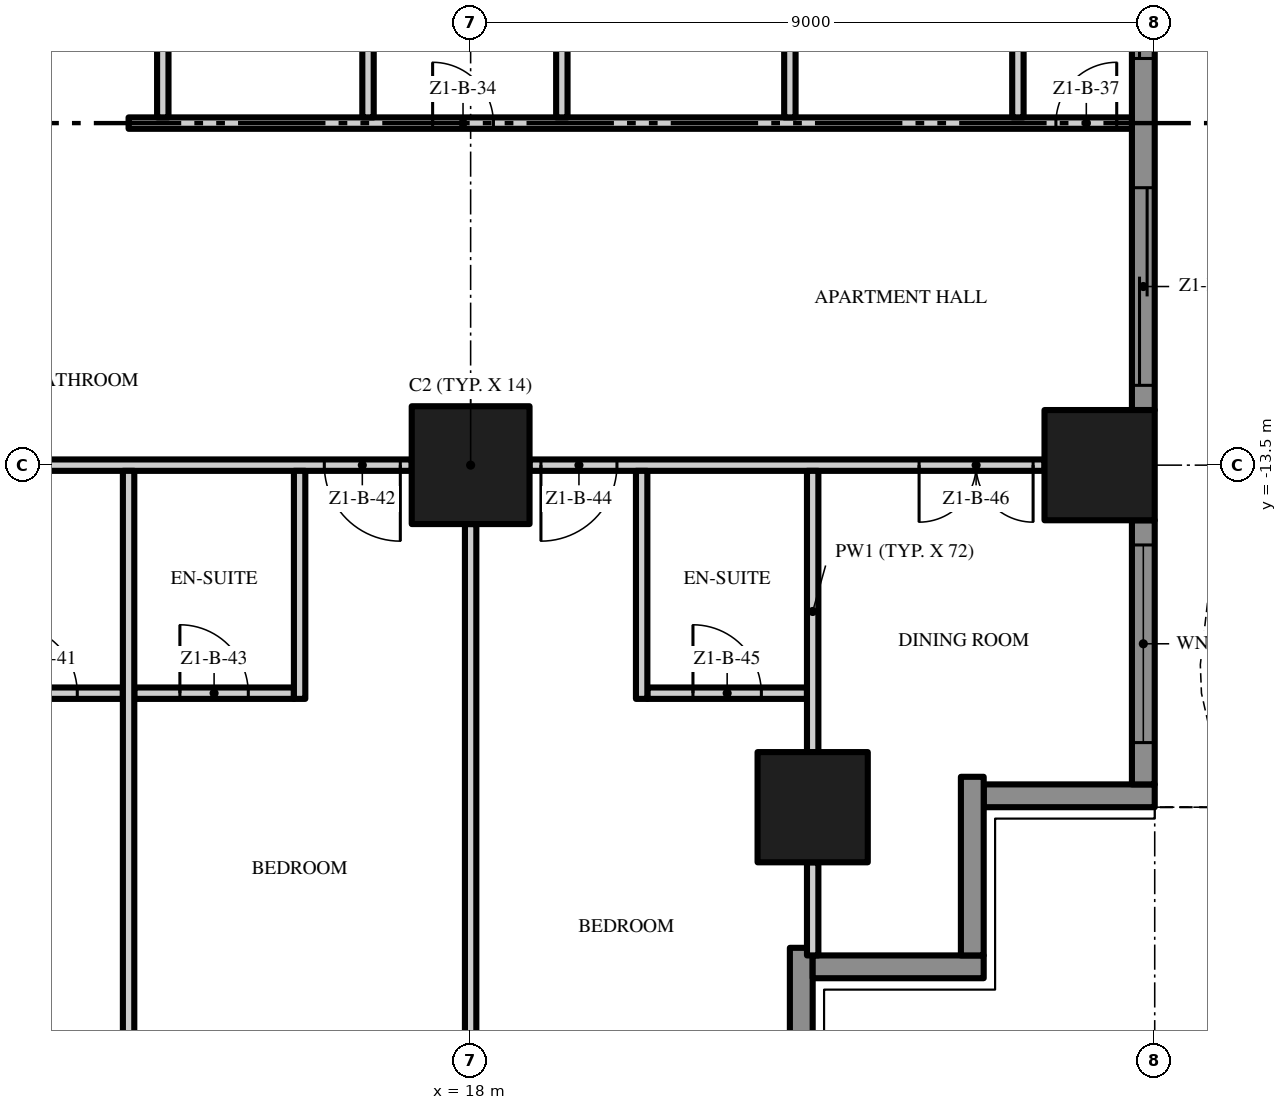
"""IFC4 building model, lengths in metres.
Left out: names, types, materials, properties, quantities, classifications, styles, units other than length and angle.
Written with IfcOpenShell. Run it as: python <this file> out.ifc"""

import sys

from ifc_helpers import new_model, si_unit, direction, frame, frame_2d, origin, origin_2d, place, context, subcontext, project, spatial, polyline, rectangle, outline, extrude, element, fill, save


model = new_model("IFC4")
c1 = context("Model", 3, precision=1e-05, world=origin(), true_north=direction((0.0, 1.0)))
c2 = subcontext(c1, "Body", "Model", "MODEL_VIEW")
j1 = project(units=[si_unit("LENGTHUNIT", "METRE"), si_unit("PLANEANGLEUNIT", "RADIAN")], contexts=[c1])
p1 = place(None, origin())
s1 = spatial("IfcSite", under=j1, at=p1, CompositionType="ELEMENT")
p2 = place(p1, origin())
s2 = spatial("IfcBuilding", under=s1, at=p2, CompositionType="ELEMENT")
p3 = place(p2, frame((0.0, 0.0, 34.0)))
s3 = spatial("IfcBuildingStorey", under=s2, at=p3, CompositionType="ELEMENT", Elevation=34.0)
p4 = place(p3, frame((18.0, -13.5, 0.0), z_axis=(0.0, 0.0, 1.0), x_axis=(1.0, 0.0, 0.0)))
e1 = element("IfcColumn", 1, at=p4, inside=s3, PredefinedType="COLUMN", context=c2, shape_type="SweptSolid", body=[
    extrude(rectangle(XDim=1.55, YDim=1.55, at=origin_2d()), origin(), (0.0, 0.0, 1.0), 3.5),
])
for number, where, z_axis, x_axis in (
    (2, (26.275, -13.5, 0.0), (0.0, 0.0, 1.0), (1.0, 0.0, 0.0)),
    (3, (22.5, -18.0, 0.0), (0.0, 0.0, 1.0), (1.0, 0.0, 0.0)),
):
    element("IfcColumn", number, at=place(p3, frame(where, z_axis=z_axis, x_axis=x_axis)), inside=s3, PredefinedType="COLUMN", context=c2, shape_type="SweptSolid", body=[
        extrude(rectangle(XDim=1.45, YDim=1.45, at=origin_2d()), origin(), (0.0, 0.0, 1.0), 3.5),
    ])
p5 = place(p3, frame((22.35, -19.85, 0.0), z_axis=(0.0, 0.0, 1.0), x_axis=(0.0, -1.0, 0.0)))
e4 = element("IfcWall", 4, at=p5, inside=s3, PredefinedType="SOLIDWALL", context=c2, shape_type="SweptSolid", body=[
    extrude(rectangle(XDim=2.35, YDim=0.3, at=frame_2d((1.175, 0.0))), origin(), (0.0, 0.0, 1.0), 3.5),
])
p6 = place(p3, frame((24.75, -20.1, 0.0), z_axis=(0.0, 0.0, 1.0), x_axis=(-1.0, 0.0, 0.0)))
e5 = element("IfcWall", 5, at=p6, inside=s3, PredefinedType="SOLIDWALL", context=c2, shape_type="SweptSolid", body=[
    extrude(rectangle(XDim=2.25, YDim=0.3, at=frame_2d((1.125, 0.0))), origin(), (0.0, 0.0, 1.0), 3.5),
])
p7 = place(p3, frame((24.6, -17.6, 0.0), z_axis=(0.0, 0.0, 1.0), x_axis=(0.0, -1.0, 0.0)))
e6 = element("IfcWall", 6, at=p7, inside=s3, PredefinedType="SOLIDWALL", context=c2, shape_type="SweptSolid", body=[
    extrude(rectangle(XDim=2.35, YDim=0.3, at=frame_2d((1.175, 0.0))), origin(), (0.0, 0.0, 1.0), 3.5),
])
p8 = place(p3, frame((27.0, -17.85, 0.0), z_axis=(0.0, 0.0, 1.0), x_axis=(-1.0, 0.0, 0.0)))
e7 = element("IfcWall", 7, at=p8, inside=s3, PredefinedType="SOLIDWALL", context=c2, shape_type="SweptSolid", body=[
    extrude(rectangle(XDim=2.25, YDim=0.3, at=frame_2d((1.125, 0.0))), origin(), (0.0, 0.0, 1.0), 3.5),
])
p9 = place(p3, frame((26.85, -14.225, 0.0), z_axis=(0.0, 0.0, 1.0), x_axis=(0.0, -1.0, 0.0)))
e8 = element("IfcWall", 8, at=p9, inside=s3, PredefinedType="SOLIDWALL", context=c2, shape_type="SweptSolid", body=[
    extrude(rectangle(XDim=3.475, YDim=0.3, at=frame_2d((1.738, 0.0))), origin(), (0.0, 0.0, 1.0), 3.5),
])
p10 = place(p9, frame((0.325, 0.0, 0.45)))
e9 = element("IfcOpeningElement", 9, at=p10, cuts=e8, PredefinedType="OPENING", context=c2, shape_type="SweptSolid", body=[
    extrude(rectangle(XDim=2.6, YDim=2.65, at=frame_2d((1.3, 1.325))), frame((0.0, 0.16, 0.0), z_axis=(0.0, -1.0, 0.0), x_axis=(1.0, 0.0, 0.0)), (0.0, 0.0, 1.0), 0.32),
])
p11 = place(p3, frame((26.85, -5.225, 0.0), z_axis=(0.0, 0.0, 1.0), x_axis=(0.0, -1.0, 0.0)))
e10 = element("IfcWall", 10, at=p11, inside=s3, PredefinedType="SOLIDWALL", context=c2, shape_type="SweptSolid", body=[
    extrude(rectangle(XDim=7.55, YDim=0.3, at=frame_2d((3.775, 0.0))), origin(), (0.0, 0.0, 1.0), 3.5),
])
p12 = place(p11, frame((4.625, 0.0, 0.0)))
e11 = element("IfcOpeningElement", 11, at=p12, cuts=e10, PredefinedType="OPENING", context=c2, shape_type="SweptSolid", body=[
    extrude(rectangle(XDim=2.6, YDim=2.4, at=frame_2d((1.3, 1.2))), frame((0.0, 0.16, 0.0), z_axis=(0.0, -1.0, 0.0), x_axis=(1.0, 0.0, 0.0)), (0.0, 0.0, 1.0), 0.32),
])
p13 = place(p11, frame((0.325, 0.0, 0.0)))
e12 = element("IfcOpeningElement", 12, at=p13, cuts=e10, PredefinedType="OPENING", context=c2, shape_type="SweptSolid", body=[
    extrude(rectangle(XDim=2.6, YDim=2.4, at=frame_2d((1.3, 1.2))), frame((0.0, 0.16, 0.0), z_axis=(0.0, -1.0, 0.0), x_axis=(1.0, 0.0, 0.0)), (0.0, 0.0, 1.0), 0.32),
])
p14 = place(p3, origin())
e13 = element("IfcWall", 13, at=p14, inside=s3, PredefinedType="USERDEFINED", context=c2, shape_type="SweptSolid", body=[
    extrude(outline(polyline([(27.951, -18.0), (27.615, -16.5), (27.6, -16.125), (27.731, -15.0), (28.255, -13.5), (28.988, -12.0), (29.649, -10.5), (29.985, -9.0), (30.0, -8.625), (29.869, -7.5), (29.345, -6.0), (28.612, -4.5), (27.951, -3.0), (27.615, -1.5), (27.6, -1.125), (27.731, 0.0), (28.255, 1.5), (28.988, 3.0), (29.649, 4.5), (29.985, 6.0), (30.0, 6.375), (29.869, 7.5), (29.345, 9.0), (28.612, 10.5), (27.951, 12.0), (27.615, 13.5), (27.6, 13.875), (27.731, 15.0), (28.255, 16.5), (28.988, 18.0), (28.763, 18.11), (28.024, 16.596), (27.486, 15.056), (27.349, 13.885), (27.366, 13.467), (27.713, 11.921), (28.385, 10.395), (29.114, 8.904), (29.624, 7.444), (29.749, 6.365), (29.736, 6.033), (29.41, 4.579), (28.761, 3.105), (28.024, 1.596), (27.486, 0.056), (27.349, -1.115), (27.366, -1.533), (27.713, -3.079), (28.385, -4.605), (29.114, -6.096), (29.624, -7.556), (29.749, -8.635), (29.736, -8.967), (29.41, -10.421), (28.761, -11.895), (28.024, -13.404), (27.486, -14.944), (27.349, -16.115), (27.366, -16.533), (27.708, -18.055), (27.951, -18.0)])), origin(), (0.0, 0.0, 1.0), 0.9),
])
p15 = place(p3, frame((11.325, -16.5, 0.0), z_axis=(0.0, 0.0, 1.0), x_axis=(1.0, 0.0, 0.0)))
e14 = element("IfcWall", 14, at=p15, inside=s3, PredefinedType="PARTITIONING", context=c2, shape_type="SweptSolid", body=[
    extrude(rectangle(XDim=2.1, YDim=0.15, at=frame_2d((1.05, 0.0))), origin(), (0.0, 0.0, 1.0), 3.5),
])
p16 = place(p15, frame((0.6, 0.0, 0.0)))
e15 = element("IfcOpeningElement", 15, at=p16, cuts=e14, PredefinedType="OPENING", context=c2, shape_type="SweptSolid", body=[
    extrude(rectangle(XDim=0.9, YDim=2.1, at=frame_2d((0.45, 1.05))), frame((0.0, 0.085, 0.0), z_axis=(0.0, -1.0, 0.0), x_axis=(1.0, 0.0, 0.0)), (0.0, 0.0, 1.0), 0.17),
])
p17 = place(p3, frame((13.575, -16.5, 0.0), z_axis=(0.0, 0.0, 1.0), x_axis=(1.0, 0.0, 0.0)))
e16 = element("IfcWall", 16, at=p17, inside=s3, PredefinedType="PARTITIONING", context=c2, shape_type="SweptSolid", body=[
    extrude(rectangle(XDim=2.1, YDim=0.15, at=frame_2d((1.05, 0.0))), origin(), (0.0, 0.0, 1.0), 3.5),
])
p18 = place(p17, frame((0.6, 0.0, 0.0)))
e17 = element("IfcOpeningElement", 17, at=p18, cuts=e16, PredefinedType="OPENING", context=c2, shape_type="SweptSolid", body=[
    extrude(rectangle(XDim=0.9, YDim=2.1, at=frame_2d((0.45, 1.05))), frame((0.0, 0.085, 0.0), z_axis=(0.0, -1.0, 0.0), x_axis=(1.0, 0.0, 0.0)), (0.0, 0.0, 1.0), 0.17),
])
p19 = place(p3, frame((20.325, -16.5, 0.0), z_axis=(0.0, 0.0, 1.0), x_axis=(1.0, 0.0, 0.0)))
e18 = element("IfcWall", 18, at=p19, inside=s3, PredefinedType="PARTITIONING", context=c2, shape_type="SweptSolid", body=[
    extrude(rectangle(XDim=2.1, YDim=0.15, at=frame_2d((1.05, 0.0))), origin(), (0.0, 0.0, 1.0), 3.5),
])
p20 = place(p19, frame((0.6, 0.0, 0.0)))
e19 = element("IfcOpeningElement", 19, at=p20, cuts=e18, PredefinedType="OPENING", context=c2, shape_type="SweptSolid", body=[
    extrude(rectangle(XDim=0.9, YDim=2.1, at=frame_2d((0.45, 1.05))), frame((0.0, 0.085, 0.0), z_axis=(0.0, -1.0, 0.0), x_axis=(1.0, 0.0, 0.0)), (0.0, 0.0, 1.0), 0.17),
])
p21 = place(p3, frame((17.225, -13.5, 0.0), z_axis=(0.0, 0.0, 1.0), x_axis=(-1.0, 0.0, 0.0)))
e20 = element("IfcWall", 20, at=p21, inside=s3, PredefinedType="PARTITIONING", context=c2, shape_type="SweptSolid", body=[
    extrude(rectangle(XDim=7.45, YDim=0.15, at=frame_2d((3.725, 0.0))), origin(), (0.0, 0.0, 1.0), 3.5),
])
p22 = place(p21, frame((6.3, 0.0, 0.0)))
e21 = element("IfcOpeningElement", 21, at=p22, cuts=e20, PredefinedType="OPENING", context=c2, shape_type="SweptSolid", body=[
    extrude(rectangle(XDim=1.0, YDim=2.4, at=frame_2d((0.5, 1.2))), frame((0.0, 0.085, 0.0), z_axis=(0.0, -1.0, 0.0), x_axis=(1.0, 0.0, 0.0)), (0.0, 0.0, 1.0), 0.17),
])
p23 = place(p21, frame((0.15, 0.0, 0.0)))
e22 = element("IfcOpeningElement", 22, at=p23, cuts=e20, PredefinedType="OPENING", context=c2, shape_type="SweptSolid", body=[
    extrude(rectangle(XDim=1.0, YDim=2.4, at=frame_2d((0.5, 1.2))), frame((0.0, 0.085, 0.0), z_axis=(0.0, -1.0, 0.0), x_axis=(1.0, 0.0, 0.0)), (0.0, 0.0, 1.0), 0.17),
])
p24 = place(p3, frame((25.55, -13.5, 0.0), z_axis=(0.0, 0.0, 1.0), x_axis=(-1.0, 0.0, 0.0)))
e23 = element("IfcWall", 23, at=p24, inside=s3, PredefinedType="PARTITIONING", context=c2, shape_type="SweptSolid", body=[
    extrude(rectangle(XDim=6.775, YDim=0.15, at=frame_2d((3.388, 0.0))), origin(), (0.0, 0.0, 1.0), 3.5),
])
p25 = place(p24, frame((5.625, 0.0, 0.0)))
e24 = element("IfcOpeningElement", 24, at=p25, cuts=e23, PredefinedType="OPENING", context=c2, shape_type="SweptSolid", body=[
    extrude(rectangle(XDim=1.0, YDim=2.4, at=frame_2d((0.5, 1.2))), frame((0.0, 0.085, 0.0), z_axis=(0.0, -1.0, 0.0), x_axis=(1.0, 0.0, 0.0)), (0.0, 0.0, 1.0), 0.17),
])
p26 = place(p24, frame((0.15, 0.0, 0.0)))
e25 = element("IfcOpeningElement", 25, at=p26, cuts=e23, PredefinedType="OPENING", context=c2, shape_type="SweptSolid", body=[
    extrude(rectangle(XDim=1.5, YDim=2.4, at=frame_2d((0.75, 1.2))), frame((0.0, 0.085, 0.0), z_axis=(0.0, -1.0, 0.0), x_axis=(1.0, 0.0, 0.0)), (0.0, 0.0, 1.0), 0.17),
])
p27 = place(p3, frame((13.5, -9.0, 0.0), z_axis=(0.0, 0.0, 1.0), x_axis=(1.0, 0.0, 0.0)))
e26 = element("IfcWall", 26, at=p27, inside=s3, PredefinedType="PARTITIONING", context=c2, shape_type="SweptSolid", body=[
    extrude(rectangle(XDim=13.2, YDim=0.15, at=frame_2d((6.6, 0.0))), origin(), (0.0, 0.0, 1.0), 3.5),
])
p28 = place(p27, frame((4.0, 0.0, 0.0)))
e27 = element("IfcOpeningElement", 27, at=p28, cuts=e26, PredefinedType="OPENING", context=c2, shape_type="SweptSolid", body=[
    extrude(rectangle(XDim=0.8, YDim=2.0, at=frame_2d((0.4, 1.0))), frame((0.0, 0.085, 0.0), z_axis=(0.0, -1.0, 0.0), x_axis=(1.0, 0.0, 0.0)), (0.0, 0.0, 1.0), 0.17),
])
p29 = place(p27, frame((12.2, 0.0, 0.0)))
e28 = element("IfcOpeningElement", 28, at=p29, cuts=e26, PredefinedType="OPENING", context=c2, shape_type="SweptSolid", body=[
    extrude(rectangle(XDim=0.8, YDim=2.0, at=frame_2d((0.4, 1.0))), frame((0.0, 0.085, 0.0), z_axis=(0.0, -1.0, 0.0), x_axis=(1.0, 0.0, 0.0)), (0.0, 0.0, 1.0), 0.17),
])
p30 = place(p3, frame((13.5, -22.2, 0.0), z_axis=(0.0, 0.0, 1.0), x_axis=(0.0, 1.0, 0.0)))
e29 = element("IfcWall", 29, at=p30, inside=s3, PredefinedType="PARTITIONING", context=c2, shape_type="SweptSolid", body=[
    extrude(rectangle(XDim=8.625, YDim=0.15, at=frame_2d((4.312, 0.0))), origin(), (0.0, 0.0, 1.0), 3.5),
])
p31 = place(p3, frame((13.95, -8.925, 0.0), z_axis=(0.0, 0.0, 1.0), x_axis=(0.0, 1.0, 0.0)))
e30 = element("IfcWall", 30, at=p31, inside=s3, PredefinedType="PARTITIONING", context=c2, shape_type="SweptSolid", body=[
    extrude(rectangle(XDim=4.5, YDim=0.15, at=frame_2d((2.25, 0.0))), origin(), (0.0, 0.0, 1.0), 3.5),
])
p32 = place(p3, frame((15.75, -16.575, 0.0), z_axis=(0.0, 0.0, 1.0), x_axis=(0.0, 1.0, 0.0)))
e31 = element("IfcWall", 31, at=p32, inside=s3, PredefinedType="PARTITIONING", context=c2, shape_type="SweptSolid", body=[
    extrude(rectangle(XDim=3.0, YDim=0.15, at=frame_2d((1.5, 0.0))), origin(), (0.0, 0.0, 1.0), 3.5),
])
p33 = place(p3, frame((16.65, -8.925, 0.0), z_axis=(0.0, 0.0, 1.0), x_axis=(0.0, 1.0, 0.0)))
e32 = element("IfcWall", 32, at=p33, inside=s3, PredefinedType="PARTITIONING", context=c2, shape_type="SweptSolid", body=[
    extrude(rectangle(XDim=4.35, YDim=0.15, at=frame_2d((2.175, 0.0))), origin(), (0.0, 0.0, 1.0), 3.5),
])
p34 = place(p3, frame((18.0, -21.05, 0.0), z_axis=(0.0, 0.0, 1.0), x_axis=(0.0, 1.0, 0.0)))
e33 = element("IfcWall", 33, at=p34, inside=s3, PredefinedType="PARTITIONING", context=c2, shape_type="SweptSolid", body=[
    extrude(rectangle(XDim=6.775, YDim=0.15, at=frame_2d((3.388, 0.0))), origin(), (0.0, 0.0, 1.0), 3.5),
])
p35 = place(p3, frame((19.2, -8.925, 0.0), z_axis=(0.0, 0.0, 1.0), x_axis=(0.0, 1.0, 0.0)))
e34 = element("IfcWall", 34, at=p35, inside=s3, PredefinedType="PARTITIONING", context=c2, shape_type="SweptSolid", body=[
    extrude(rectangle(XDim=4.35, YDim=0.15, at=frame_2d((2.175, 0.0))), origin(), (0.0, 0.0, 1.0), 3.5),
])
p36 = place(p3, frame((20.25, -16.575, 0.0), z_axis=(0.0, 0.0, 1.0), x_axis=(0.0, 1.0, 0.0)))
e35 = element("IfcWall", 35, at=p36, inside=s3, PredefinedType="PARTITIONING", context=c2, shape_type="SweptSolid", body=[
    extrude(rectangle(XDim=3.0, YDim=0.15, at=frame_2d((1.5, 0.0))), origin(), (0.0, 0.0, 1.0), 3.5),
])
p37 = place(p3, frame((22.2, -8.925, 0.0), z_axis=(0.0, 0.0, 1.0), x_axis=(0.0, 1.0, 0.0)))
e36 = element("IfcWall", 36, at=p37, inside=s3, PredefinedType="PARTITIONING", context=c2, shape_type="SweptSolid", body=[
    extrude(rectangle(XDim=4.35, YDim=0.15, at=frame_2d((2.175, 0.0))), origin(), (0.0, 0.0, 1.0), 3.5),
])
p38 = place(p3, frame((22.5, -19.95, 0.0), z_axis=(0.0, 0.0, 1.0), x_axis=(0.0, 1.0, 0.0)))
e37 = element("IfcWall", 37, at=p38, inside=s3, PredefinedType="PARTITIONING", context=c2, shape_type="SweptSolid", body=[
    extrude(rectangle(XDim=1.225, YDim=0.15, at=frame_2d((0.613, 0.0))), origin(), (0.0, 0.0, 1.0), 3.5),
])
p39 = place(p3, frame((22.5, -17.275, 0.0), z_axis=(0.0, 0.0, 1.0), x_axis=(0.0, 1.0, 0.0)))
e38 = element("IfcWall", 38, at=p39, inside=s3, PredefinedType="PARTITIONING", context=c2, shape_type="SweptSolid", body=[
    extrude(rectangle(XDim=3.7, YDim=0.15, at=frame_2d((1.85, 0.0))), origin(), (0.0, 0.0, 1.0), 3.5),
])
p40 = place(p3, frame((25.2, -8.925, 0.0), z_axis=(0.0, 0.0, 1.0), x_axis=(0.0, 1.0, 0.0)))
e39 = element("IfcWall", 39, at=p40, inside=s3, PredefinedType="PARTITIONING", context=c2, shape_type="SweptSolid", body=[
    extrude(rectangle(XDim=4.35, YDim=0.15, at=frame_2d((2.175, 0.0))), origin(), (0.0, 0.0, 1.0), 3.5),
])
p41 = place(p10, origin())
e40 = element("IfcWindow", 40, at=p41, inside=s3, PartitioningType="SINGLE_PANEL", PredefinedType="WINDOW", context=c2, shape_type="SweptSolid", body=[
    extrude(rectangle(XDim=2.6, YDim=2.65, at=frame_2d((1.3, 1.325))), frame((0.0, 0.03, 0.0), z_axis=(0.0, -1.0, 0.0), x_axis=(1.0, 0.0, 0.0)), (0.0, 0.0, 1.0), 0.06),
])
fill(e9, e40)
p42 = place(p12, origin())
e41 = element("IfcDoor", 41, at=p42, inside=s3, OperationType="SINGLE_SWING_LEFT", PredefinedType="DOOR", context=c2, shape_type="SweptSolid", body=[
    extrude(rectangle(XDim=2.6, YDim=2.4, at=frame_2d((1.3, 1.2))), frame((0.0, 0.025, 0.0), z_axis=(0.0, -1.0, 0.0), x_axis=(1.0, 0.0, 0.0)), (0.0, 0.0, 1.0), 0.05),
])
fill(e11, e41)
p43 = place(p13, origin())
e42 = element("IfcDoor", 42, at=p43, inside=s3, OperationType="SINGLE_SWING_LEFT", PredefinedType="DOOR", context=c2, shape_type="SweptSolid", body=[
    extrude(rectangle(XDim=2.6, YDim=2.4, at=frame_2d((1.3, 1.2))), frame((0.0, 0.025, 0.0), z_axis=(0.0, -1.0, 0.0), x_axis=(1.0, 0.0, 0.0)), (0.0, 0.0, 1.0), 0.05),
])
fill(e12, e42)
p44 = place(p28, origin())
e43 = element("IfcDoor", 43, at=p44, inside=s3, OperationType="SINGLE_SWING_LEFT", PredefinedType="DOOR", context=c2, shape_type="SweptSolid", body=[
    extrude(rectangle(XDim=0.8, YDim=2.0, at=frame_2d((0.4, 1.0))), frame((0.0, 0.025, 0.0), z_axis=(0.0, -1.0, 0.0), x_axis=(1.0, 0.0, 0.0)), (0.0, 0.0, 1.0), 0.05),
])
fill(e27, e43)
p45 = place(p29, origin())
e44 = element("IfcDoor", 44, at=p45, inside=s3, OperationType="SINGLE_SWING_RIGHT", PredefinedType="DOOR", context=c2, shape_type="SweptSolid", body=[
    extrude(rectangle(XDim=0.8, YDim=2.0, at=frame_2d((0.4, 1.0))), frame((0.0, 0.025, 0.0), z_axis=(0.0, -1.0, 0.0), x_axis=(1.0, 0.0, 0.0)), (0.0, 0.0, 1.0), 0.05),
])
fill(e28, e44)
p46 = place(p16, origin())
e45 = element("IfcDoor", 45, at=p46, inside=s3, OperationType="SINGLE_SWING_LEFT", PredefinedType="DOOR", context=c2, shape_type="SweptSolid", body=[
    extrude(rectangle(XDim=0.9, YDim=2.1, at=frame_2d((0.45, 1.05))), frame((0.0, 0.025, 0.0), z_axis=(0.0, -1.0, 0.0), x_axis=(1.0, 0.0, 0.0)), (0.0, 0.0, 1.0), 0.05),
])
fill(e15, e45)
p47 = place(p23, origin())
e46 = element("IfcDoor", 46, at=p47, inside=s3, OperationType="SINGLE_SWING_LEFT", PredefinedType="DOOR", context=c2, shape_type="SweptSolid", body=[
    extrude(rectangle(XDim=1.0, YDim=2.4, at=frame_2d((0.5, 1.2))), frame((0.0, 0.025, 0.0), z_axis=(0.0, -1.0, 0.0), x_axis=(1.0, 0.0, 0.0)), (0.0, 0.0, 1.0), 0.05),
])
fill(e22, e46)
p48 = place(p18, origin())
e47 = element("IfcDoor", 47, at=p48, inside=s3, OperationType="SINGLE_SWING_LEFT", PredefinedType="DOOR", context=c2, shape_type="SweptSolid", body=[
    extrude(rectangle(XDim=0.9, YDim=2.1, at=frame_2d((0.45, 1.05))), frame((0.0, 0.025, 0.0), z_axis=(0.0, -1.0, 0.0), x_axis=(1.0, 0.0, 0.0)), (0.0, 0.0, 1.0), 0.05),
])
fill(e17, e47)
p49 = place(p25, origin())
e48 = element("IfcDoor", 48, at=p49, inside=s3, OperationType="SINGLE_SWING_RIGHT", PredefinedType="DOOR", context=c2, shape_type="SweptSolid", body=[
    extrude(rectangle(XDim=1.0, YDim=2.4, at=frame_2d((0.5, 1.2))), frame((0.0, 0.025, 0.0), z_axis=(0.0, -1.0, 0.0), x_axis=(1.0, 0.0, 0.0)), (0.0, 0.0, 1.0), 0.05),
])
fill(e24, e48)
p50 = place(p20, origin())
e49 = element("IfcDoor", 49, at=p50, inside=s3, OperationType="SINGLE_SWING_LEFT", PredefinedType="DOOR", context=c2, shape_type="SweptSolid", body=[
    extrude(rectangle(XDim=0.9, YDim=2.1, at=frame_2d((0.45, 1.05))), frame((0.0, 0.025, 0.0), z_axis=(0.0, -1.0, 0.0), x_axis=(1.0, 0.0, 0.0)), (0.0, 0.0, 1.0), 0.05),
])
fill(e19, e49)
p51 = place(p26, origin())
e50 = element("IfcDoor", 50, at=p51, inside=s3, OperationType="DOUBLE_DOOR_SINGLE_SWING", PredefinedType="DOOR", context=c2, shape_type="SweptSolid", body=[
    extrude(rectangle(XDim=1.5, YDim=2.4, at=frame_2d((0.75, 1.2))), frame((0.0, 0.025, 0.0), z_axis=(0.0, -1.0, 0.0), x_axis=(1.0, 0.0, 0.0)), (0.0, 0.0, 1.0), 0.05),
])
fill(e25, e50)
save(model, sys.argv[1])
